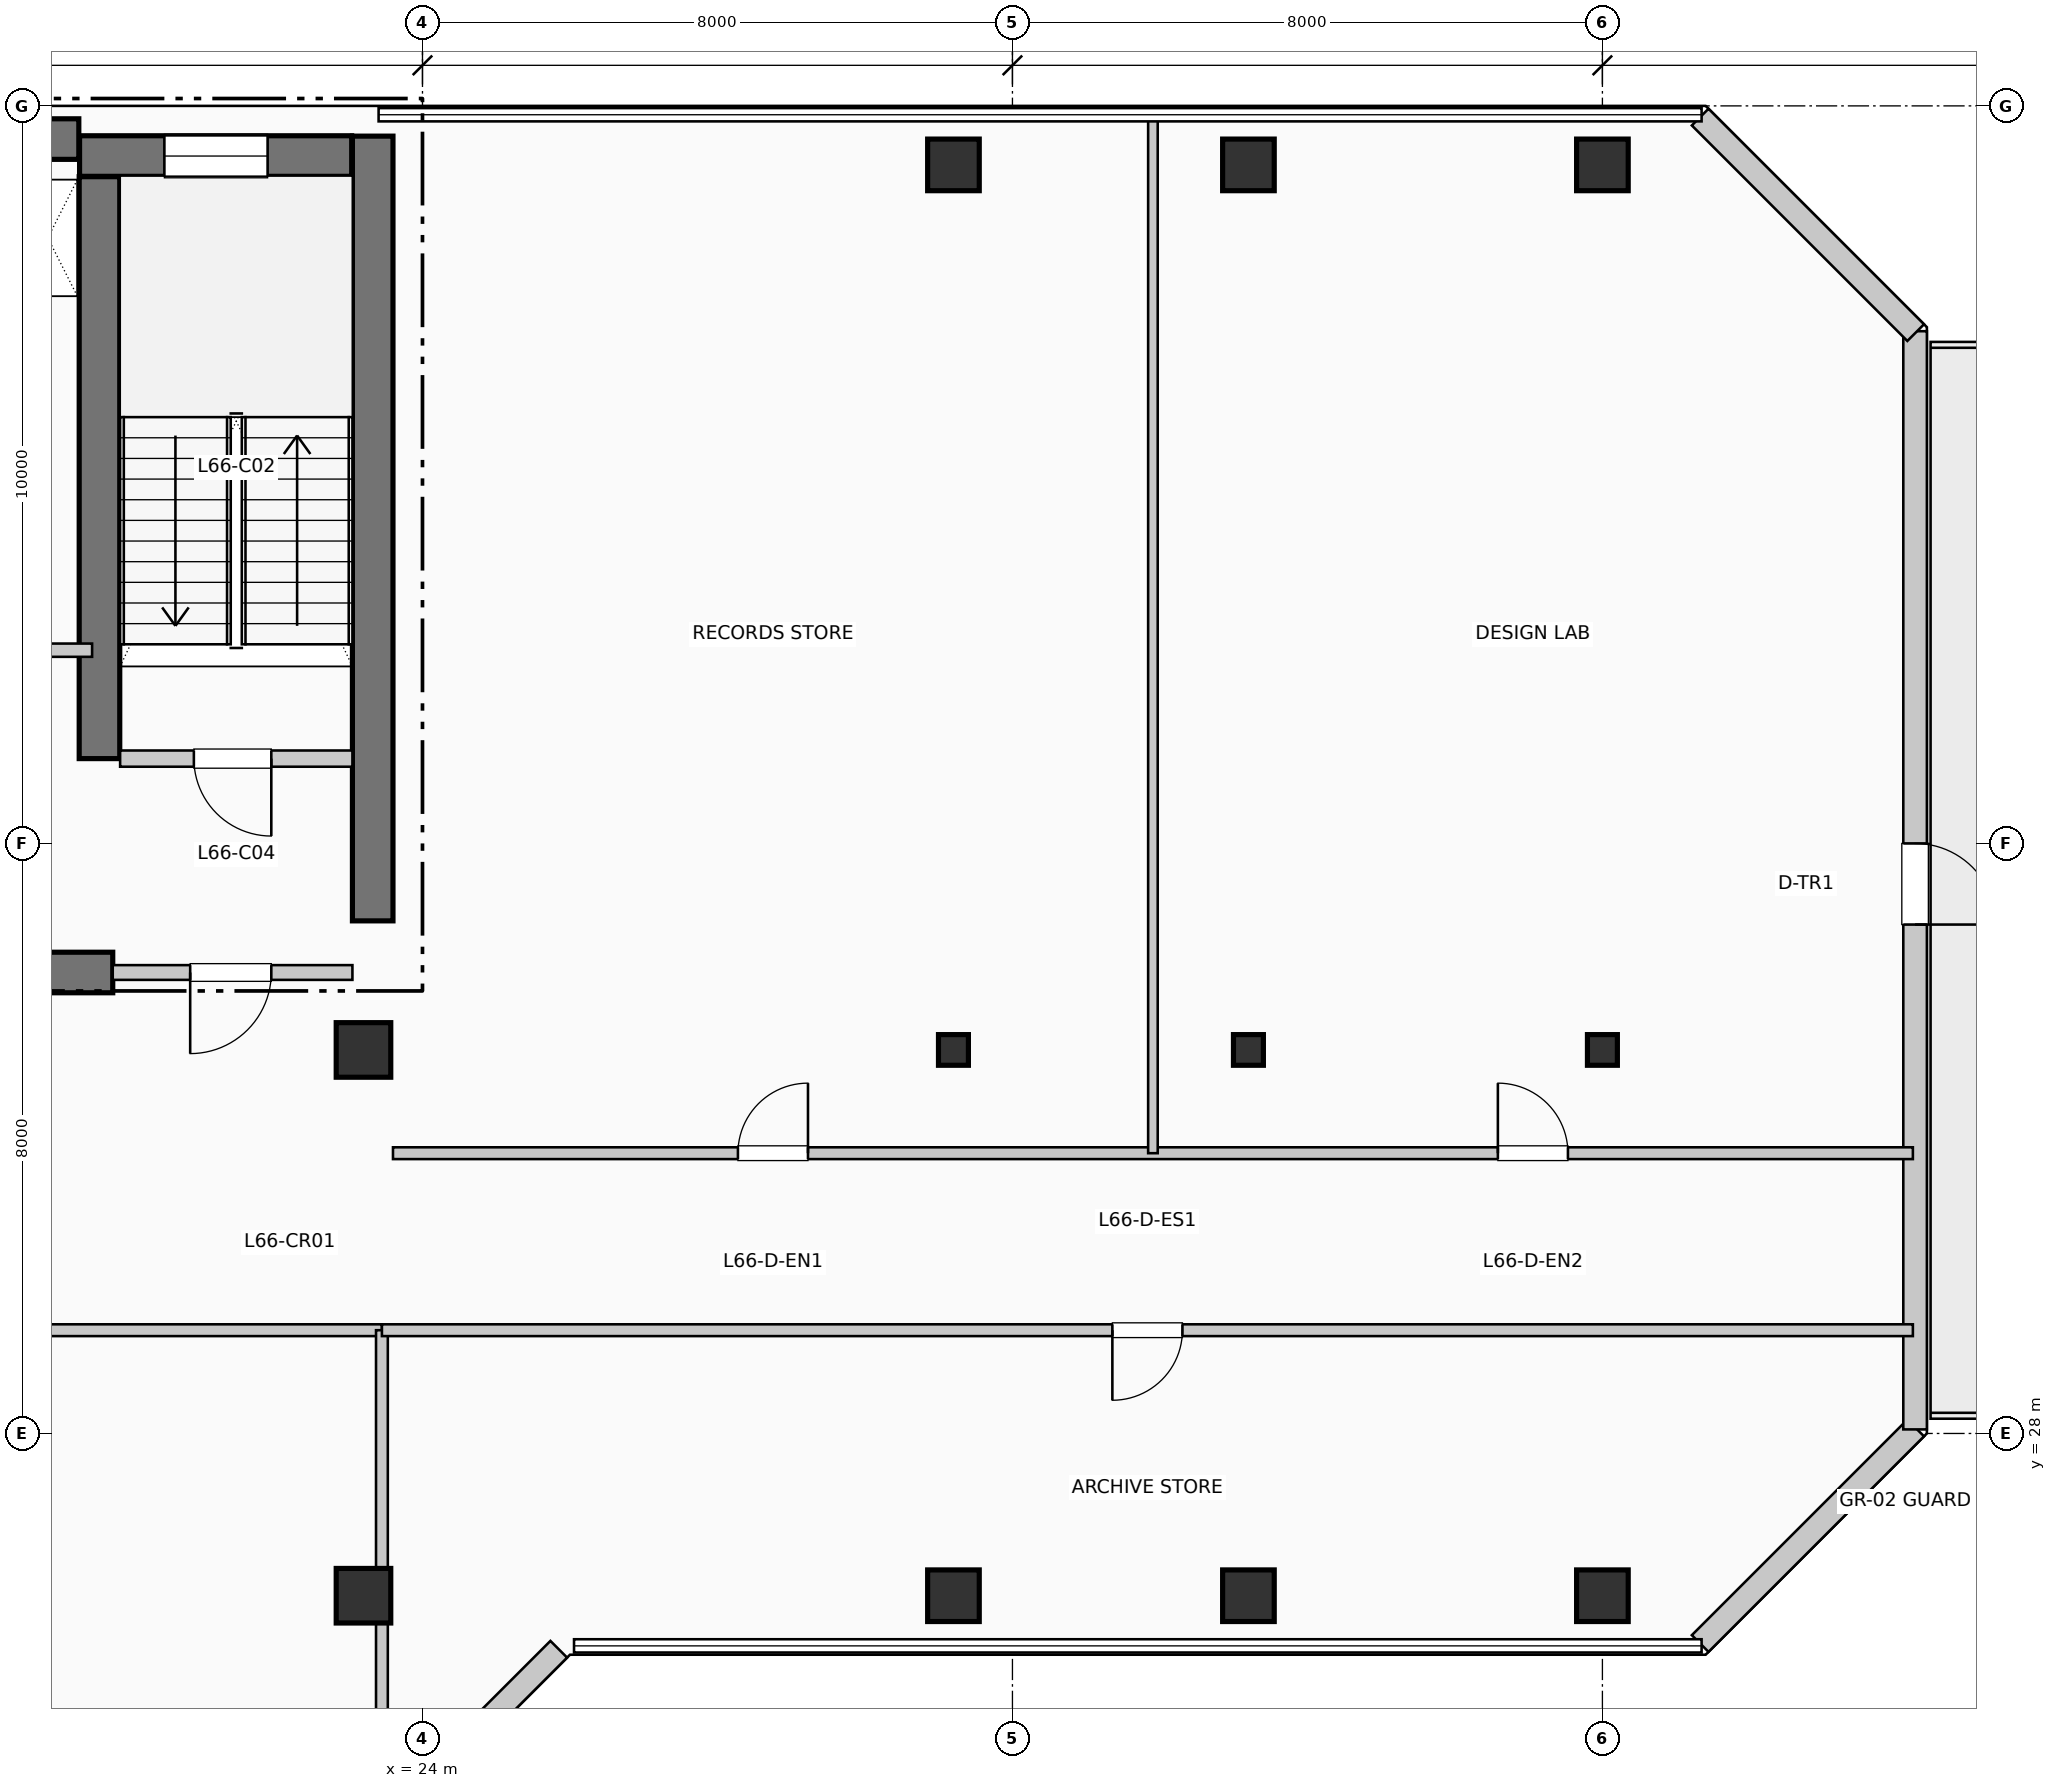
"""IFC4 building model, lengths in metres.
Left out: names, types, materials, properties, quantities, classifications, styles, units other than length and angle.
Written with IfcOpenShell. Run it as: python <this file> out.ifc"""

import sys

from ifc_helpers import new_model, si_unit, direction, frame, frame_2d, origin, origin_2d, place, context, subcontext, project, spatial, rectangle, i_section, extrude, element, fill, save


model = new_model("IFC4")
c1 = context("Model", 3, precision=1e-05, world=origin(), true_north=direction((0.0, 1.0)))
c2 = subcontext(c1, "Body", "Model", "MODEL_VIEW")
j1 = project(units=[si_unit("LENGTHUNIT", "METRE"), si_unit("PLANEANGLEUNIT", "RADIAN")], contexts=[c1])
p1 = place(None, origin())
s1 = spatial("IfcSite", under=j1, at=p1, CompositionType="ELEMENT")
p2 = place(p1, origin())
s2 = spatial("IfcBuilding", under=s1, at=p2, CompositionType="ELEMENT")
p3 = place(p2, frame((0.0, 0.0, 272.25)))
s3 = spatial("IfcBuildingStorey", under=s2, at=p3, CompositionType="ELEMENT", Elevation=272.25)
p4 = place(p3, frame((5.36, 45.55, 0.0), z_axis=(0.0, 0.0, 1.0), x_axis=(1.0, 0.0, 0.0)))
e1 = element("IfcWall", 1, at=p4, inside=s3, PredefinedType="SHEAR", context=c2, shape_type="SweptSolid", body=[
    extrude(rectangle(XDim=13.98, YDim=0.55, at=frame_2d((6.99, 0.0))), origin(), (0.0, 0.0, 1.0), 3.96),
])
p5 = place(p3, frame((23.325, 34.95, 0.0), z_axis=(0.0, 0.0, 1.0), x_axis=(0.0, 1.0, 0.0)))
e2 = element("IfcWall", 2, at=p5, inside=s3, PredefinedType="SHEAR", context=c2, shape_type="SweptSolid", body=[
    extrude(rectangle(XDim=10.64, YDim=0.55, at=frame_2d((5.32, 0.0))), origin(), (0.0, 0.0, 1.0), 3.96),
])
p6 = place(p3, frame((13.68, 34.25, 0.0), z_axis=(0.0, 0.0, 1.0), x_axis=(1.0, 0.0, 0.0)))
e3 = element("IfcWall", 3, at=p6, inside=s3, PredefinedType="SHEAR", context=c2, shape_type="SweptSolid", body=[
    extrude(rectangle(XDim=6.12, YDim=0.55, at=frame_2d((3.06, 0.0))), origin(), (0.0, 0.0, 1.0), 3.96),
])
p7 = place(p3, frame((19.62, 37.15, 0.0), z_axis=(0.0, 0.0, 1.0), x_axis=(0.0, 1.0, 0.0)))
e4 = element("IfcWall", 4, at=p7, inside=s3, PredefinedType="SHEAR", context=c2, shape_type="SweptSolid", body=[
    extrude(rectangle(XDim=7.89, YDim=0.55, at=frame_2d((3.945, 0.0))), origin(), (0.0, 0.0, 1.0), 3.96),
])
p8 = place(p3, frame((19.35, 45.32, 0.0), z_axis=(0.0, 0.0, 1.0), x_axis=(1.0, 0.0, 0.0)))
e5 = element("IfcWall", 5, at=p8, inside=s3, PredefinedType="SHEAR", context=c2, shape_type="SweptSolid", body=[
    extrude(rectangle(XDim=3.69, YDim=0.55, at=frame_2d((1.845, 0.0))), origin(), (0.0, 0.0, 1.0), 3.96),
])
p9 = place(p8, frame((1.15, 0.0, 1.05)))
e6 = element("IfcOpeningElement", 6, at=p9, cuts=e5, PredefinedType="OPENING", context=c2, shape_type="SweptSolid", body=[
    extrude(rectangle(XDim=1.4, YDim=1.8, at=frame_2d((0.7, 0.9))), frame((0.0, 0.285, 0.0), z_axis=(0.0, -1.0, 0.0), x_axis=(1.0, 0.0, 0.0)), (0.0, 0.0, 1.0), 0.57),
])
for number, where, z_axis, x_axis in (
    (7, (23.2, 25.8, 0.0), (0.0, 0.0, 1.0), (1.0, 0.0, 0.0)),
    (8, (23.2, 33.2, 0.0), (0.0, 0.0, 1.0), (1.0, 0.0, 0.0)),
):
    element("IfcColumn", number, at=place(p3, frame(where, z_axis=z_axis, x_axis=x_axis)), inside=s3, PredefinedType="COLUMN", context=c2, shape_type="SweptSolid", body=[
        extrude(rectangle(XDim=0.74, YDim=0.74, at=origin_2d()), origin(), (0.0, 0.0, 1.0), 3.96),
    ])
p10 = place(p3, frame((31.2, 25.8, 0.0), z_axis=(0.0, 0.0, 1.0), x_axis=(1.0, 0.0, 0.0)))
e9 = element("IfcColumn", 9, at=p10, inside=s3, PredefinedType="COLUMN", context=c2, shape_type="SweptSolid", body=[
    extrude(rectangle(XDim=0.7, YDim=0.7, at=origin_2d()), origin(), (0.0, 0.0, 1.0), 3.96),
])
p11 = place(p3, frame((31.2, 33.2, 0.0), z_axis=(0.0, 0.0, 1.0), x_axis=(1.0, 0.0, 0.0)))
e10 = element("IfcColumn", 10, at=p11, inside=s3, PredefinedType="COLUMN", context=c2, shape_type="SweptSolid", body=[
    extrude(i_section(OverallWidth=0.406, OverallDepth=0.416, WebThickness=0.022, FlangeThickness=0.036, at=origin_2d()), origin(), (0.0, 0.0, 1.0), 3.96),
])
for number, where, z_axis, x_axis in (
    (11, (31.2, 45.2, 0.0), (0.0, 0.0, 1.0), (1.0, 0.0, 0.0)),
    (12, (35.2, 25.8, 0.0), (0.0, 0.0, 1.0), (1.0, 0.0, 0.0)),
):
    element("IfcColumn", number, at=place(p3, frame(where, z_axis=z_axis, x_axis=x_axis)), inside=s3, PredefinedType="COLUMN", context=c2, shape_type="SweptSolid", body=[
        extrude(rectangle(XDim=0.7, YDim=0.7, at=origin_2d()), origin(), (0.0, 0.0, 1.0), 3.96),
    ])
p12 = place(p3, frame((35.2, 33.2, 0.0), z_axis=(0.0, 0.0, 1.0), x_axis=(1.0, 0.0, 0.0)))
e13 = element("IfcColumn", 13, at=p12, inside=s3, PredefinedType="COLUMN", context=c2, shape_type="SweptSolid", body=[
    extrude(i_section(OverallWidth=0.406, OverallDepth=0.416, WebThickness=0.022, FlangeThickness=0.036, at=origin_2d()), origin(), (0.0, 0.0, 1.0), 3.96),
])
for number, where, z_axis, x_axis in (
    (14, (35.2, 45.2, 0.0), (0.0, 0.0, 1.0), (1.0, 0.0, 0.0)),
    (15, (40.0, 25.8, 0.0), (0.0, 0.0, 1.0), (1.0, 0.0, 0.0)),
):
    element("IfcColumn", number, at=place(p3, frame(where, z_axis=z_axis, x_axis=x_axis)), inside=s3, PredefinedType="COLUMN", context=c2, shape_type="SweptSolid", body=[
        extrude(rectangle(XDim=0.7, YDim=0.7, at=origin_2d()), origin(), (0.0, 0.0, 1.0), 3.96),
    ])
p13 = place(p3, frame((40.0, 33.2, 0.0), z_axis=(0.0, 0.0, 1.0), x_axis=(1.0, 0.0, 0.0)))
e16 = element("IfcColumn", 16, at=p13, inside=s3, PredefinedType="COLUMN", context=c2, shape_type="SweptSolid", body=[
    extrude(i_section(OverallWidth=0.406, OverallDepth=0.416, WebThickness=0.022, FlangeThickness=0.036, at=origin_2d()), origin(), (0.0, 0.0, 1.0), 3.96),
])
p14 = place(p3, frame((40.0, 45.2, 0.0), z_axis=(0.0, 0.0, 1.0), x_axis=(1.0, 0.0, 0.0)))
e17 = element("IfcColumn", 17, at=p14, inside=s3, PredefinedType="COLUMN", context=c2, shape_type="SweptSolid", body=[
    extrude(rectangle(XDim=0.7, YDim=0.7, at=origin_2d()), origin(), (0.0, 0.0, 1.0), 3.96),
])
p15 = place(p3, frame((23.926, 23.152, 0.0), z_axis=(0.0, 0.0, 1.0), x_axis=(0.707106781187, 0.707106781187, 0.0)))
e18 = element("IfcWall", 18, at=p15, inside=s3, PredefinedType="SOLIDWALL", context=c2, shape_type="SweptSolid", body=[
    extrude(rectangle(XDim=2.718, YDim=0.32, at=frame_2d((1.359, 0.0))), origin(), (0.0, 0.0, 1.0), 3.74),
])
p16 = place(p3, frame((41.326, 25.152, 0.0), z_axis=(0.0, 0.0, 1.0), x_axis=(0.707136318428, 0.707077242712, 0.0)))
e19 = element("IfcWall", 19, at=p16, inside=s3, PredefinedType="SOLIDWALL", context=c2, shape_type="SweptSolid", body=[
    extrude(rectangle(XDim=4.133, YDim=0.32, at=frame_2d((2.066, 0.0))), origin(), (0.0, 0.0, 1.0), 3.74),
])
p17 = place(p3, frame((44.24, 28.055, 0.0), z_axis=(0.0, 0.0, 1.0), x_axis=(0.0, 1.0, 0.0)))
e20 = element("IfcWall", 20, at=p17, inside=s3, PredefinedType="SOLIDWALL", context=c2, shape_type="SweptSolid", body=[
    extrude(rectangle(XDim=14.89, YDim=0.32, at=frame_2d((7.445, 0.0))), origin(), (0.0, 0.0, 1.0), 3.74),
])
p18 = place(p17, frame((7.945, 0.0, 0.0), z_axis=(0.0, 0.0, 1.0), x_axis=(-1.0, 0.0, 0.0)))
e21 = element("IfcOpeningElement", 21, at=p18, cuts=e20, PredefinedType="OPENING", context=c2, shape_type="SweptSolid", body=[
    extrude(rectangle(XDim=1.1, YDim=2.2, at=frame_2d((0.55, 1.1))), frame((0.0, 0.17, 0.0), z_axis=(0.0, -1.0, 0.0), x_axis=(1.0, 0.0, 0.0)), (0.0, 0.0, 1.0), 0.34),
])
p19 = place(p3, frame((44.248, 42.926, 0.0), z_axis=(0.0, 0.0, 1.0), x_axis=(-0.707136318428, 0.707077242712, 0.0)))
e22 = element("IfcWall", 22, at=p19, inside=s3, PredefinedType="SOLIDWALL", context=c2, shape_type="SweptSolid", body=[
    extrude(rectangle(XDim=4.133, YDim=0.32, at=frame_2d((2.066, 0.0))), origin(), (0.0, 0.0, 1.0), 3.74),
])
p20 = place(p3, frame((19.9, 37.15, 0.0), z_axis=(0.0, 0.0, 1.0), x_axis=(1.0, 0.0, 0.0)))
e23 = element("IfcWall", 23, at=p20, inside=s3, PredefinedType="PARTITIONING", context=c2, shape_type="SweptSolid", body=[
    extrude(rectangle(XDim=3.15, YDim=0.22, at=frame_2d((1.575, 0.0))), origin(), (0.0, 0.0, 1.0), 3.74),
])
p21 = place(p20, frame((2.05, 0.0, 0.0), z_axis=(0.0, 0.0, 1.0), x_axis=(-1.0, 0.0, 0.0)))
e24 = element("IfcOpeningElement", 24, at=p21, cuts=e23, PredefinedType="OPENING", context=c2, shape_type="SweptSolid", body=[
    extrude(rectangle(XDim=1.05, YDim=2.15, at=frame_2d((0.525, 1.075))), frame((0.0, 0.12, 0.0), z_axis=(0.0, -1.0, 0.0), x_axis=(1.0, 0.0, 0.0)), (0.0, 0.0, 1.0), 0.24),
])
p22 = place(p3, frame((19.8, 34.25, 0.0), z_axis=(0.0, 0.0, 1.0), x_axis=(1.0, 0.0, 0.0)))
e25 = element("IfcWall", 25, at=p22, inside=s3, PredefinedType="PARTITIONING", context=c2, shape_type="SweptSolid", body=[
    extrude(rectangle(XDim=3.25, YDim=0.2, at=frame_2d((1.625, 0.0))), origin(), (0.0, 0.0, 1.0), 3.74),
])
p23 = place(p22, frame((2.15, 0.0, 0.0), z_axis=(0.0, 0.0, 1.0), x_axis=(-1.0, 0.0, 0.0)))
e26 = element("IfcOpeningElement", 26, at=p23, cuts=e25, PredefinedType="OPENING", context=c2, shape_type="SweptSolid", body=[
    extrude(rectangle(XDim=1.1, YDim=2.15, at=frame_2d((0.55, 1.075))), frame((0.0, 0.11, 0.0), z_axis=(0.0, -1.0, 0.0), x_axis=(1.0, 0.0, 0.0)), (0.0, 0.0, 1.0), 0.22),
])
p24 = place(p3, frame((17.68, 38.62, 0.0), z_axis=(0.0, 0.0, 1.0), x_axis=(1.0, 0.0, 0.0)))
e27 = element("IfcWall", 27, at=p24, inside=s3, PredefinedType="PARTITIONING", context=c2, shape_type="SweptSolid", body=[
    extrude(rectangle(XDim=1.84, YDim=0.18, at=frame_2d((0.92, 0.0))), origin(), (0.0, 0.0, 1.0), 3.74),
])
p25 = place(p24, frame((0.24, 0.0, 0.0)))
e28 = element("IfcOpeningElement", 28, at=p25, cuts=e27, PredefinedType="OPENING", context=c2, shape_type="SweptSolid", body=[
    extrude(rectangle(XDim=0.92, YDim=2.1, at=frame_2d((0.46, 1.05))), frame((0.0, 0.1, 0.0), z_axis=(0.0, -1.0, 0.0), x_axis=(1.0, 0.0, 0.0)), (0.0, 0.0, 1.0), 0.2),
])
p26 = place(p3, frame((18.5, 29.4, 0.0), z_axis=(0.0, 0.0, 1.0), x_axis=(1.0, 0.0, 0.0)))
e29 = element("IfcWall", 29, at=p26, inside=s3, PredefinedType="PARTITIONING", context=c2, shape_type="SweptSolid", body=[
    extrude(rectangle(XDim=4.95, YDim=0.16, at=frame_2d((2.475, 0.0))), origin(), (0.0, 0.0, 1.0), 3.425),
])
p27 = place(p3, frame((23.45, 5.99, 0.0), z_axis=(0.0, 0.0, 1.0), x_axis=(0.0, 1.0, 0.0)))
e30 = element("IfcWall", 30, at=p27, inside=s3, PredefinedType="PARTITIONING", context=c2, shape_type="SweptSolid", body=[
    extrude(rectangle(XDim=23.41, YDim=0.16, at=frame_2d((11.705, 0.0))), origin(), (0.0, 0.0, 1.0), 3.175),
])
p28 = place(p3, frame((23.45, 29.4, 0.0), z_axis=(0.0, 0.0, 1.0), x_axis=(1.0, 0.0, 0.0)))
e31 = element("IfcWall", 31, at=p28, inside=s3, PredefinedType="PARTITIONING", context=c2, shape_type="SweptSolid", body=[
    extrude(rectangle(XDim=20.76, YDim=0.16, at=frame_2d((10.38, 0.0))), origin(), (0.0, 0.0, 1.0), 3.425),
])
p29 = place(p28, frame((10.855, 0.0, 0.0), z_axis=(0.0, 0.0, 1.0), x_axis=(-1.0, 0.0, 0.0)))
e32 = element("IfcOpeningElement", 32, at=p29, cuts=e31, PredefinedType="OPENING", context=c2, shape_type="SweptSolid", body=[
    extrude(rectangle(XDim=0.95, YDim=2.15, at=frame_2d((0.475, 1.075))), frame((0.0, 0.09, 0.0), z_axis=(0.0, -1.0, 0.0), x_axis=(1.0, 0.0, 0.0)), (0.0, 0.0, 1.0), 0.18),
])
p30 = place(p3, frame((23.6, 31.8, 0.0), z_axis=(0.0, 0.0, 1.0), x_axis=(1.0, 0.0, 0.0)))
e33 = element("IfcWall", 33, at=p30, inside=s3, PredefinedType="PARTITIONING", context=c2, shape_type="SweptSolid", body=[
    extrude(rectangle(XDim=20.61, YDim=0.16, at=frame_2d((10.305, 0.0))), origin(), (0.0, 0.0, 1.0), 3.74),
])
p31 = place(p30, frame((4.677, 0.0, 0.0)))
e34 = element("IfcOpeningElement", 34, at=p31, cuts=e33, PredefinedType="OPENING", context=c2, shape_type="SweptSolid", body=[
    extrude(rectangle(XDim=0.95, YDim=2.15, at=frame_2d((0.475, 1.075))), frame((0.0, 0.09, 0.0), z_axis=(0.0, -1.0, 0.0), x_axis=(1.0, 0.0, 0.0)), (0.0, 0.0, 1.0), 0.18),
])
p32 = place(p30, frame((14.982, 0.0, 0.0)))
e35 = element("IfcOpeningElement", 35, at=p32, cuts=e33, PredefinedType="OPENING", context=c2, shape_type="SweptSolid", body=[
    extrude(rectangle(XDim=0.95, YDim=2.15, at=frame_2d((0.475, 1.075))), frame((0.0, 0.09, 0.0), z_axis=(0.0, -1.0, 0.0), x_axis=(1.0, 0.0, 0.0)), (0.0, 0.0, 1.0), 0.18),
])
p33 = place(p3, frame((33.905, 31.8, 0.0), z_axis=(0.0, 0.0, 1.0), x_axis=(0.0, 1.0, 0.0)))
e36 = element("IfcWall", 36, at=p33, inside=s3, PredefinedType="PARTITIONING", context=c2, shape_type="SweptSolid", body=[
    extrude(rectangle(XDim=14.01, YDim=0.13, at=frame_2d((7.005, 0.0))), origin(), (0.0, 0.0, 1.0), 3.74),
])
p34 = place(p9, origin())
e37 = element("IfcWindow", 37, at=p34, inside=s3, PartitioningType="SINGLE_PANEL", PredefinedType="WINDOW", context=c2, shape_type="SweptSolid", body=[
    extrude(rectangle(XDim=1.4, YDim=1.8, at=frame_2d((0.7, 0.9))), frame((0.0, 0.03, 0.0), z_axis=(0.0, -1.0, 0.0), x_axis=(1.0, 0.0, 0.0)), (0.0, 0.0, 1.0), 0.06),
])
fill(e6, e37)
p35 = place(p18, origin())
e38 = element("IfcDoor", 38, at=p35, inside=s3, OperationType="SINGLE_SWING_LEFT", PredefinedType="DOOR", context=c2, shape_type="SweptSolid", body=[
    extrude(rectangle(XDim=1.1, YDim=2.2, at=frame_2d((0.55, 1.1))), frame((0.0, 0.025, 0.0), z_axis=(0.0, -1.0, 0.0), x_axis=(1.0, 0.0, 0.0)), (0.0, 0.0, 1.0), 0.05),
])
fill(e21, e38)
p36 = place(p21, origin())
e39 = element("IfcDoor", 39, at=p36, inside=s3, OperationType="SINGLE_SWING_RIGHT", PredefinedType="DOOR", context=c2, shape_type="SweptSolid", body=[
    extrude(rectangle(XDim=1.05, YDim=2.15, at=frame_2d((0.525, 1.075))), frame((0.0, 0.025, 0.0), z_axis=(0.0, -1.0, 0.0), x_axis=(1.0, 0.0, 0.0)), (0.0, 0.0, 1.0), 0.05),
])
fill(e24, e39)
p37 = place(p23, origin())
e40 = element("IfcDoor", 40, at=p37, inside=s3, OperationType="SINGLE_SWING_LEFT", PredefinedType="DOOR", context=c2, shape_type="SweptSolid", body=[
    extrude(rectangle(XDim=1.1, YDim=2.15, at=frame_2d((0.55, 1.075))), frame((0.0, 0.025, 0.0), z_axis=(0.0, -1.0, 0.0), x_axis=(1.0, 0.0, 0.0)), (0.0, 0.0, 1.0), 0.05),
])
fill(e26, e40)
p38 = place(p29, origin())
e41 = element("IfcDoor", 41, at=p38, inside=s3, OperationType="SINGLE_SWING_LEFT", PredefinedType="DOOR", context=c2, shape_type="SweptSolid", body=[
    extrude(rectangle(XDim=0.95, YDim=2.15, at=frame_2d((0.475, 1.075))), frame((0.0, 0.025, 0.0), z_axis=(0.0, -1.0, 0.0), x_axis=(1.0, 0.0, 0.0)), (0.0, 0.0, 1.0), 0.05),
])
fill(e32, e41)
p39 = place(p31, origin())
e42 = element("IfcDoor", 42, at=p39, inside=s3, OperationType="SINGLE_SWING_RIGHT", PredefinedType="DOOR", context=c2, shape_type="SweptSolid", body=[
    extrude(rectangle(XDim=0.95, YDim=2.15, at=frame_2d((0.475, 1.075))), frame((0.0, 0.025, 0.0), z_axis=(0.0, -1.0, 0.0), x_axis=(1.0, 0.0, 0.0)), (0.0, 0.0, 1.0), 0.05),
])
fill(e34, e42)
p40 = place(p32, origin())
e43 = element("IfcDoor", 43, at=p40, inside=s3, OperationType="SINGLE_SWING_LEFT", PredefinedType="DOOR", context=c2, shape_type="SweptSolid", body=[
    extrude(rectangle(XDim=0.95, YDim=2.15, at=frame_2d((0.475, 1.075))), frame((0.0, 0.025, 0.0), z_axis=(0.0, -1.0, 0.0), x_axis=(1.0, 0.0, 0.0)), (0.0, 0.0, 1.0), 0.05),
])
fill(e35, e43)
save(model, sys.argv[1])
